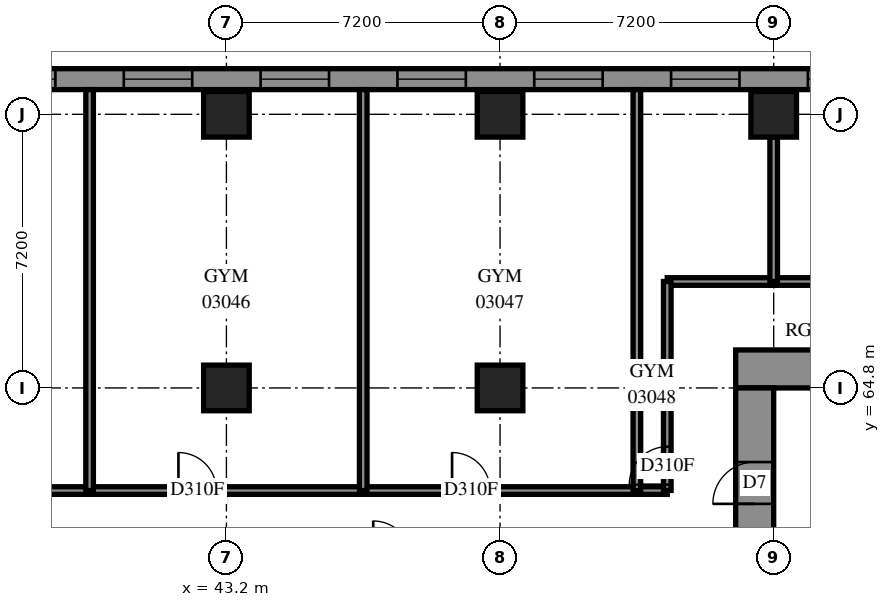
"""IFC4 building model, lengths in metres.
Left out: names, types, materials, properties, quantities, classifications, styles, units other than length and angle.
Written with IfcOpenShell. Run it as: python <this file> out.ifc"""

import sys

from ifc_helpers import new_model, si_unit, direction, frame, frame_2d, origin, origin_2d, place, context, subcontext, project, spatial, polyline, rectangle, outline, extrude, element, fill, save


model = new_model("IFC4")
c1 = context("Model", 3, precision=1e-05, world=origin(), true_north=direction((0.0, 1.0)))
c2 = subcontext(c1, "Body", "Model", "MODEL_VIEW")
j1 = project(units=[si_unit("LENGTHUNIT", "METRE"), si_unit("PLANEANGLEUNIT", "RADIAN")], contexts=[c1])
p1 = place(None, origin())
s1 = spatial("IfcSite", under=j1, at=p1, CompositionType="ELEMENT")
p2 = place(p1, origin())
s2 = spatial("IfcBuilding", under=s1, at=p2, CompositionType="ELEMENT")
p3 = place(p2, frame((0.0, 0.0, 14.4)))
s3 = spatial("IfcBuildingStorey", under=s2, at=p3, CompositionType="ELEMENT", Elevation=14.4)
for number, where, z_axis, x_axis in (
    (1, (43.2, 64.8, 0.0), (0.0, 0.0, 1.0), (1.0, 0.0, 0.0)),
    (2, (43.2, 72.0, 0.0), (0.0, 0.0, 1.0), (1.0, 0.0, 0.0)),
    (3, (50.4, 64.8, 0.0), (0.0, 0.0, 1.0), (1.0, 0.0, 0.0)),
    (4, (50.4, 72.0, 0.0), (0.0, 0.0, 1.0), (1.0, 0.0, 0.0)),
    (5, (57.6, 72.0, 0.0), (0.0, 0.0, 1.0), (1.0, 0.0, 0.0)),
):
    element("IfcColumn", number, at=place(p3, frame(where, z_axis=z_axis, x_axis=x_axis)), inside=s3, PredefinedType="COLUMN", context=c2, shape_type="SweptSolid", body=[
        extrude(rectangle(XDim=1.2, YDim=1.2, at=origin_2d()), origin(), (0.0, 0.0, 1.0), 3.8),
    ])
p4 = place(p3, frame((56.6, 65.3, -0.4), z_axis=(0.0, 0.0, 1.0), x_axis=(1.0, 0.0, 0.0)))
e6 = element("IfcWall", 6, at=p4, inside=s3, PredefinedType="SHEAR", context=c2, shape_type="SweptSolid", body=[
    extrude(rectangle(XDim=16.4, YDim=1.0, at=frame_2d((8.2, 0.0))), origin(), (0.0, 0.0, 1.0), 3.5),
])
p5 = place(p4, frame((11.0, 0.0, 0.4)))
e7 = element("IfcOpeningElement", 7, at=p5, cuts=e6, PredefinedType="OPENING", context=c2, shape_type="SweptSolid", body=[
    extrude(rectangle(XDim=0.8, YDim=2.1, at=frame_2d((0.4, 1.05))), frame((0.0, 0.51, 0.0), z_axis=(0.0, -1.0, 0.0), x_axis=(1.0, 0.0, 0.0)), (0.0, 0.0, 1.0), 1.02),
])
p6 = place(p3, frame((57.1, 50.4, -0.4), z_axis=(0.0, 0.0, 1.0), x_axis=(0.0, 1.0, 0.0)))
e8 = element("IfcWall", 8, at=p6, inside=s3, PredefinedType="SHEAR", context=c2, shape_type="SweptSolid", body=[
    extrude(rectangle(XDim=14.4, YDim=1.0, at=frame_2d((7.2, 0.0))), origin(), (0.0, 0.0, 1.0), 3.5),
])
p7 = place(p6, frame((4.55, 0.0, 0.4)))
e9 = element("IfcOpeningElement", 9, at=p7, cuts=e8, PredefinedType="OPENING", context=c2, shape_type="SweptSolid", body=[
    extrude(rectangle(XDim=1.1, YDim=2.1, at=frame_2d((0.55, 1.05))), frame((0.0, 0.51, 0.0), z_axis=(0.0, -1.0, 0.0), x_axis=(1.0, 0.0, 0.0)), (0.0, 0.0, 1.0), 1.02),
])
p8 = place(p6, frame((11.35, 0.0, 0.4)))
e10 = element("IfcOpeningElement", 10, at=p8, cuts=e8, PredefinedType="OPENING", context=c2, shape_type="SweptSolid", body=[
    extrude(rectangle(XDim=1.1, YDim=2.1, at=frame_2d((0.55, 1.05))), frame((0.0, 0.51, 0.0), z_axis=(0.0, -1.0, 0.0), x_axis=(1.0, 0.0, 0.0)), (0.0, 0.0, 1.0), 1.02),
])
p9 = place(p3, frame((79.583, 72.925, 0.0), z_axis=(0.0, 0.0, 1.0), x_axis=(-1.0, 0.0, 0.0)))
e11 = element("IfcWall", 11, at=p9, inside=s3, PredefinedType="SOLIDWALL", context=c2, shape_type="SweptSolid", body=[
    extrude(outline(polyline([(-0.114, -0.275), (79.583, -0.275), (79.033, 0.275), (0.114, 0.275), (-0.114, -0.275)])), origin(), (0.0, 0.0, 1.0), 3.8),
])
p10 = place(p9, frame((1.249, 0.0, 0.7)))
e12 = element("IfcOpeningElement", 12, at=p10, cuts=e11, PredefinedType="OPENING", context=c2, shape_type="SweptSolid", body=[
    extrude(rectangle(XDim=1.8, YDim=2.6, at=frame_2d((0.9, 1.3))), frame((0.0, 0.285, 0.0), z_axis=(0.0, -1.0, 0.0), x_axis=(1.0, 0.0, 0.0)), (0.0, 0.0, 1.0), 0.57),
])
p11 = place(p9, frame((4.883, 0.0, 0.7)))
e13 = element("IfcOpeningElement", 13, at=p11, cuts=e11, PredefinedType="OPENING", context=c2, shape_type="SweptSolid", body=[
    extrude(rectangle(XDim=1.8, YDim=2.6, at=frame_2d((0.9, 1.3))), frame((0.0, 0.285, 0.0), z_axis=(0.0, -1.0, 0.0), x_axis=(1.0, 0.0, 0.0)), (0.0, 0.0, 1.0), 0.57),
])
p12 = place(p9, frame((8.483, 0.0, 0.7)))
e14 = element("IfcOpeningElement", 14, at=p12, cuts=e11, PredefinedType="OPENING", context=c2, shape_type="SweptSolid", body=[
    extrude(rectangle(XDim=1.8, YDim=2.6, at=frame_2d((0.9, 1.3))), frame((0.0, 0.285, 0.0), z_axis=(0.0, -1.0, 0.0), x_axis=(1.0, 0.0, 0.0)), (0.0, 0.0, 1.0), 0.57),
])
p13 = place(p9, frame((12.083, 0.0, 0.7)))
e15 = element("IfcOpeningElement", 15, at=p13, cuts=e11, PredefinedType="OPENING", context=c2, shape_type="SweptSolid", body=[
    extrude(rectangle(XDim=1.8, YDim=2.6, at=frame_2d((0.9, 1.3))), frame((0.0, 0.285, 0.0), z_axis=(0.0, -1.0, 0.0), x_axis=(1.0, 0.0, 0.0)), (0.0, 0.0, 1.0), 0.57),
])
p14 = place(p9, frame((15.683, 0.0, 0.7)))
e16 = element("IfcOpeningElement", 16, at=p14, cuts=e11, PredefinedType="OPENING", context=c2, shape_type="SweptSolid", body=[
    extrude(rectangle(XDim=1.8, YDim=2.6, at=frame_2d((0.9, 1.3))), frame((0.0, 0.285, 0.0), z_axis=(0.0, -1.0, 0.0), x_axis=(1.0, 0.0, 0.0)), (0.0, 0.0, 1.0), 0.57),
])
p15 = place(p9, frame((19.283, 0.0, 0.7)))
e17 = element("IfcOpeningElement", 17, at=p15, cuts=e11, PredefinedType="OPENING", context=c2, shape_type="SweptSolid", body=[
    extrude(rectangle(XDim=1.8, YDim=2.6, at=frame_2d((0.9, 1.3))), frame((0.0, 0.285, 0.0), z_axis=(0.0, -1.0, 0.0), x_axis=(1.0, 0.0, 0.0)), (0.0, 0.0, 1.0), 0.57),
])
p16 = place(p9, frame((22.883, 0.0, 0.7)))
e18 = element("IfcOpeningElement", 18, at=p16, cuts=e11, PredefinedType="OPENING", context=c2, shape_type="SweptSolid", body=[
    extrude(rectangle(XDim=1.8, YDim=2.6, at=frame_2d((0.9, 1.3))), frame((0.0, 0.285, 0.0), z_axis=(0.0, -1.0, 0.0), x_axis=(1.0, 0.0, 0.0)), (0.0, 0.0, 1.0), 0.57),
])
p17 = place(p9, frame((26.483, 0.0, 0.7)))
e19 = element("IfcOpeningElement", 19, at=p17, cuts=e11, PredefinedType="OPENING", context=c2, shape_type="SweptSolid", body=[
    extrude(rectangle(XDim=1.8, YDim=2.6, at=frame_2d((0.9, 1.3))), frame((0.0, 0.285, 0.0), z_axis=(0.0, -1.0, 0.0), x_axis=(1.0, 0.0, 0.0)), (0.0, 0.0, 1.0), 0.57),
])
p18 = place(p9, frame((30.083, 0.0, 0.7)))
e20 = element("IfcOpeningElement", 20, at=p18, cuts=e11, PredefinedType="OPENING", context=c2, shape_type="SweptSolid", body=[
    extrude(rectangle(XDim=1.8, YDim=2.6, at=frame_2d((0.9, 1.3))), frame((0.0, 0.285, 0.0), z_axis=(0.0, -1.0, 0.0), x_axis=(1.0, 0.0, 0.0)), (0.0, 0.0, 1.0), 0.57),
])
p19 = place(p9, frame((33.683, 0.0, 0.7)))
e21 = element("IfcOpeningElement", 21, at=p19, cuts=e11, PredefinedType="OPENING", context=c2, shape_type="SweptSolid", body=[
    extrude(rectangle(XDim=1.8, YDim=2.6, at=frame_2d((0.9, 1.3))), frame((0.0, 0.285, 0.0), z_axis=(0.0, -1.0, 0.0), x_axis=(1.0, 0.0, 0.0)), (0.0, 0.0, 1.0), 0.57),
])
p20 = place(p9, frame((37.283, 0.0, 0.7)))
e22 = element("IfcOpeningElement", 22, at=p20, cuts=e11, PredefinedType="OPENING", context=c2, shape_type="SweptSolid", body=[
    extrude(rectangle(XDim=1.8, YDim=2.6, at=frame_2d((0.9, 1.3))), frame((0.0, 0.285, 0.0), z_axis=(0.0, -1.0, 0.0), x_axis=(1.0, 0.0, 0.0)), (0.0, 0.0, 1.0), 0.57),
])
p21 = place(p9, frame((40.883, 0.0, 0.7)))
e23 = element("IfcOpeningElement", 23, at=p21, cuts=e11, PredefinedType="OPENING", context=c2, shape_type="SweptSolid", body=[
    extrude(rectangle(XDim=1.8, YDim=2.6, at=frame_2d((0.9, 1.3))), frame((0.0, 0.285, 0.0), z_axis=(0.0, -1.0, 0.0), x_axis=(1.0, 0.0, 0.0)), (0.0, 0.0, 1.0), 0.57),
])
p22 = place(p9, frame((44.483, 0.0, 0.7)))
e24 = element("IfcOpeningElement", 24, at=p22, cuts=e11, PredefinedType="OPENING", context=c2, shape_type="SweptSolid", body=[
    extrude(rectangle(XDim=1.8, YDim=2.6, at=frame_2d((0.9, 1.3))), frame((0.0, 0.285, 0.0), z_axis=(0.0, -1.0, 0.0), x_axis=(1.0, 0.0, 0.0)), (0.0, 0.0, 1.0), 0.57),
])
p23 = place(p9, frame((48.083, 0.0, 0.7)))
e25 = element("IfcOpeningElement", 25, at=p23, cuts=e11, PredefinedType="OPENING", context=c2, shape_type="SweptSolid", body=[
    extrude(rectangle(XDim=1.8, YDim=2.6, at=frame_2d((0.9, 1.3))), frame((0.0, 0.285, 0.0), z_axis=(0.0, -1.0, 0.0), x_axis=(1.0, 0.0, 0.0)), (0.0, 0.0, 1.0), 0.57),
])
p24 = place(p9, frame((51.683, 0.0, 0.7)))
e26 = element("IfcOpeningElement", 26, at=p24, cuts=e11, PredefinedType="OPENING", context=c2, shape_type="SweptSolid", body=[
    extrude(rectangle(XDim=1.8, YDim=2.6, at=frame_2d((0.9, 1.3))), frame((0.0, 0.285, 0.0), z_axis=(0.0, -1.0, 0.0), x_axis=(1.0, 0.0, 0.0)), (0.0, 0.0, 1.0), 0.57),
])
p25 = place(p9, frame((55.283, 0.0, 0.7)))
e27 = element("IfcOpeningElement", 27, at=p25, cuts=e11, PredefinedType="OPENING", context=c2, shape_type="SweptSolid", body=[
    extrude(rectangle(XDim=1.8, YDim=2.6, at=frame_2d((0.9, 1.3))), frame((0.0, 0.285, 0.0), z_axis=(0.0, -1.0, 0.0), x_axis=(1.0, 0.0, 0.0)), (0.0, 0.0, 1.0), 0.57),
])
p26 = place(p9, frame((58.883, 0.0, 0.7)))
e28 = element("IfcOpeningElement", 28, at=p26, cuts=e11, PredefinedType="OPENING", context=c2, shape_type="SweptSolid", body=[
    extrude(rectangle(XDim=1.8, YDim=2.6, at=frame_2d((0.9, 1.3))), frame((0.0, 0.285, 0.0), z_axis=(0.0, -1.0, 0.0), x_axis=(1.0, 0.0, 0.0)), (0.0, 0.0, 1.0), 0.57),
])
p27 = place(p9, frame((62.483, 0.0, 0.7)))
e29 = element("IfcOpeningElement", 29, at=p27, cuts=e11, PredefinedType="OPENING", context=c2, shape_type="SweptSolid", body=[
    extrude(rectangle(XDim=1.8, YDim=2.6, at=frame_2d((0.9, 1.3))), frame((0.0, 0.285, 0.0), z_axis=(0.0, -1.0, 0.0), x_axis=(1.0, 0.0, 0.0)), (0.0, 0.0, 1.0), 0.57),
])
p28 = place(p9, frame((66.083, 0.0, 0.7)))
e30 = element("IfcOpeningElement", 30, at=p28, cuts=e11, PredefinedType="OPENING", context=c2, shape_type="SweptSolid", body=[
    extrude(rectangle(XDim=1.8, YDim=2.6, at=frame_2d((0.9, 1.3))), frame((0.0, 0.285, 0.0), z_axis=(0.0, -1.0, 0.0), x_axis=(1.0, 0.0, 0.0)), (0.0, 0.0, 1.0), 0.57),
])
p29 = place(p9, frame((69.683, 0.0, 0.7)))
e31 = element("IfcOpeningElement", 31, at=p29, cuts=e11, PredefinedType="OPENING", context=c2, shape_type="SweptSolid", body=[
    extrude(rectangle(XDim=1.8, YDim=2.6, at=frame_2d((0.9, 1.3))), frame((0.0, 0.285, 0.0), z_axis=(0.0, -1.0, 0.0), x_axis=(1.0, 0.0, 0.0)), (0.0, 0.0, 1.0), 0.57),
])
p30 = place(p9, frame((73.683, 0.0, 0.7)))
e32 = element("IfcOpeningElement", 32, at=p30, cuts=e11, PredefinedType="OPENING", context=c2, shape_type="SweptSolid", body=[
    extrude(rectangle(XDim=1.8, YDim=2.6, at=frame_2d((0.9, 1.3))), frame((0.0, 0.285, 0.0), z_axis=(0.0, -1.0, 0.0), x_axis=(1.0, 0.0, 0.0)), (0.0, 0.0, 1.0), 0.57),
])
p31 = place(p9, frame((76.508, 0.0, 0.7)))
e33 = element("IfcOpeningElement", 33, at=p31, cuts=e11, PredefinedType="OPENING", context=c2, shape_type="SweptSolid", body=[
    extrude(rectangle(XDim=1.8, YDim=2.6, at=frame_2d((0.9, 1.3))), frame((0.0, 0.285, 0.0), z_axis=(0.0, -1.0, 0.0), x_axis=(1.0, 0.0, 0.0)), (0.0, 0.0, 1.0), 0.57),
])
p32 = place(p3, frame((0.002, 62.1, 0.0), z_axis=(0.0, 0.0, 1.0), x_axis=(1.0, 0.0, 0.0)))
e34 = element("IfcWall", 34, at=p32, inside=s3, PredefinedType="PARTITIONING", context=c2, shape_type="SweptSolid", body=[
    extrude(rectangle(XDim=54.798, YDim=0.2, at=frame_2d((27.399, 0.0))), origin(), (0.0, 0.0, 1.0), 3.8),
])
p33 = place(p32, frame((8.667, 0.0, 0.0)))
e35 = element("IfcOpeningElement", 35, at=p33, cuts=e34, PredefinedType="OPENING", context=c2, shape_type="SweptSolid", body=[
    extrude(rectangle(XDim=1.0, YDim=2.1, at=frame_2d((0.5, 1.05))), frame((0.0, 0.11, 0.0), z_axis=(0.0, -1.0, 0.0), x_axis=(1.0, 0.0, 0.0)), (0.0, 0.0, 1.0), 0.22),
])
p34 = place(p32, frame((13.136, 0.0, 0.0)))
e36 = element("IfcOpeningElement", 36, at=p34, cuts=e34, PredefinedType="OPENING", context=c2, shape_type="SweptSolid", body=[
    extrude(rectangle(XDim=1.0, YDim=2.1, at=frame_2d((0.5, 1.05))), frame((0.0, 0.11, 0.0), z_axis=(0.0, -1.0, 0.0), x_axis=(1.0, 0.0, 0.0)), (0.0, 0.0, 1.0), 0.22),
])
p35 = place(p32, frame((20.335, 0.0, 0.0)))
e37 = element("IfcOpeningElement", 37, at=p35, cuts=e34, PredefinedType="OPENING", context=c2, shape_type="SweptSolid", body=[
    extrude(rectangle(XDim=1.0, YDim=2.1, at=frame_2d((0.5, 1.05))), frame((0.0, 0.11, 0.0), z_axis=(0.0, -1.0, 0.0), x_axis=(1.0, 0.0, 0.0)), (0.0, 0.0, 1.0), 0.22),
])
p36 = place(p32, frame((27.535, 0.0, 0.0)))
e38 = element("IfcOpeningElement", 38, at=p36, cuts=e34, PredefinedType="OPENING", context=c2, shape_type="SweptSolid", body=[
    extrude(rectangle(XDim=1.0, YDim=2.1, at=frame_2d((0.5, 1.05))), frame((0.0, 0.11, 0.0), z_axis=(0.0, -1.0, 0.0), x_axis=(1.0, 0.0, 0.0)), (0.0, 0.0, 1.0), 0.22),
])
p37 = place(p32, frame((34.736, 0.0, 0.0)))
e39 = element("IfcOpeningElement", 39, at=p37, cuts=e34, PredefinedType="OPENING", context=c2, shape_type="SweptSolid", body=[
    extrude(rectangle(XDim=1.0, YDim=2.1, at=frame_2d((0.5, 1.05))), frame((0.0, 0.11, 0.0), z_axis=(0.0, -1.0, 0.0), x_axis=(1.0, 0.0, 0.0)), (0.0, 0.0, 1.0), 0.22),
])
p38 = place(p32, frame((41.935, 0.0, 0.0)))
e40 = element("IfcOpeningElement", 40, at=p38, cuts=e34, PredefinedType="OPENING", context=c2, shape_type="SweptSolid", body=[
    extrude(rectangle(XDim=1.0, YDim=2.1, at=frame_2d((0.5, 1.05))), frame((0.0, 0.11, 0.0), z_axis=(0.0, -1.0, 0.0), x_axis=(1.0, 0.0, 0.0)), (0.0, 0.0, 1.0), 0.22),
])
p39 = place(p32, frame((49.136, 0.0, 0.0)))
e41 = element("IfcOpeningElement", 41, at=p39, cuts=e34, PredefinedType="OPENING", context=c2, shape_type="SweptSolid", body=[
    extrude(rectangle(XDim=1.0, YDim=2.1, at=frame_2d((0.5, 1.05))), frame((0.0, 0.11, 0.0), z_axis=(0.0, -1.0, 0.0), x_axis=(1.0, 0.0, 0.0)), (0.0, 0.0, 1.0), 0.22),
])
p40 = place(p32, frame((4.799, 0.0, 0.0)))
e42 = element("IfcOpeningElement", 42, at=p40, cuts=e34, PredefinedType="OPENING", context=c2, shape_type="SweptSolid", body=[
    extrude(rectangle(XDim=1.0, YDim=2.1, at=frame_2d((0.5, 1.05))), frame((0.0, 0.11, 0.0), z_axis=(0.0, -1.0, 0.0), x_axis=(1.0, 0.0, 0.0)), (0.0, 0.0, 1.0), 0.22),
])
p41 = place(p3, frame((54.8, 67.6, 0.0), z_axis=(0.0, 0.0, 1.0), x_axis=(1.0, 0.0, 0.0)))
e43 = element("IfcWall", 43, at=p41, inside=s3, PredefinedType="PARTITIONING", context=c2, shape_type="SweptSolid", body=[
    extrude(rectangle(XDim=20.0, YDim=0.2, at=frame_2d((10.0, 0.0))), origin(), (0.0, 0.0, 1.0), 3.8),
])
p42 = place(p41, frame((6.662, 0.0, 0.0)))
e44 = element("IfcOpeningElement", 44, at=p42, cuts=e43, PredefinedType="OPENING", context=c2, shape_type="SweptSolid", body=[
    extrude(rectangle(XDim=1.0, YDim=2.1, at=frame_2d((0.5, 1.05))), frame((0.0, 0.11, 0.0), z_axis=(0.0, -1.0, 0.0), x_axis=(1.0, 0.0, 0.0)), (0.0, 0.0, 1.0), 0.22),
])
p43 = place(p41, frame((13.863, 0.0, 0.0)))
e45 = element("IfcOpeningElement", 45, at=p43, cuts=e43, PredefinedType="OPENING", context=c2, shape_type="SweptSolid", body=[
    extrude(rectangle(XDim=1.0, YDim=2.1, at=frame_2d((0.5, 1.05))), frame((0.0, 0.11, 0.0), z_axis=(0.0, -1.0, 0.0), x_axis=(1.0, 0.0, 0.0)), (0.0, 0.0, 1.0), 0.22),
])
for number, where, z_axis, x_axis in (
    (46, (39.6, 62.1, 0.0), (0.0, 0.0, 1.0), (0.0, 1.0, 0.0)),
    (47, (46.8, 62.1, 0.0), (0.0, 0.0, 1.0), (0.0, 1.0, 0.0)),
    (48, (54.0, 62.1, 0.0), (0.0, 0.0, 1.0), (0.0, 1.0, 0.0)),
):
    element("IfcWall", number, at=place(p3, frame(where, z_axis=z_axis, x_axis=x_axis)), inside=s3, PredefinedType="PARTITIONING", context=c2, shape_type="SweptSolid", body=[
        extrude(rectangle(XDim=10.55, YDim=0.2, at=frame_2d((5.275, 0.0))), origin(), (0.0, 0.0, 1.0), 3.8),
    ])
p44 = place(p3, frame((54.8, 62.102, 0.0), z_axis=(0.0, 0.0, 1.0), x_axis=(0.0, 1.0, 0.0)))
e49 = element("IfcWall", 49, at=p44, inside=s3, PredefinedType="PARTITIONING", context=c2, shape_type="SweptSolid", body=[
    extrude(rectangle(XDim=5.498, YDim=0.2, at=frame_2d((2.749, 0.0))), origin(), (0.0, 0.0, 1.0), 3.8),
])
p45 = place(p44, frame((0.152, 0.0, 0.0)))
e50 = element("IfcOpeningElement", 50, at=p45, cuts=e49, PredefinedType="OPENING", context=c2, shape_type="SweptSolid", body=[
    extrude(rectangle(XDim=1.0, YDim=2.1, at=frame_2d((0.5, 1.05))), frame((0.0, 0.11, 0.0), z_axis=(0.0, -1.0, 0.0), x_axis=(1.0, 0.0, 0.0)), (0.0, 0.0, 1.0), 0.22),
])
p46 = place(p3, frame((57.6, 67.6, 0.0), z_axis=(0.0, 0.0, 1.0), x_axis=(0.0, 1.0, 0.0)))
e51 = element("IfcWall", 51, at=p46, inside=s3, PredefinedType="PARTITIONING", context=c2, shape_type="SweptSolid", body=[
    extrude(rectangle(XDim=3.8, YDim=0.2, at=frame_2d((1.9, 0.0))), origin(), (0.0, 0.0, 1.0), 3.8),
])
p47 = place(p15, origin())
e52 = element("IfcWindow", 52, at=p47, inside=s3, PartitioningType="SINGLE_PANEL", PredefinedType="WINDOW", context=c2, shape_type="SweptSolid", body=[
    extrude(rectangle(XDim=1.8, YDim=2.6, at=frame_2d((0.9, 1.3))), frame((0.0, 0.155, 0.0), z_axis=(0.0, -1.0, 0.0), x_axis=(1.0, 0.0, 0.0)), (0.0, 0.0, 1.0), 0.06),
])
fill(e17, e52)
p48 = place(p16, origin())
e53 = element("IfcWindow", 53, at=p48, inside=s3, PartitioningType="SINGLE_PANEL", PredefinedType="WINDOW", context=c2, shape_type="SweptSolid", body=[
    extrude(rectangle(XDim=1.8, YDim=2.6, at=frame_2d((0.9, 1.3))), frame((0.0, 0.155, 0.0), z_axis=(0.0, -1.0, 0.0), x_axis=(1.0, 0.0, 0.0)), (0.0, 0.0, 1.0), 0.06),
])
fill(e18, e53)
p49 = place(p17, origin())
e54 = element("IfcWindow", 54, at=p49, inside=s3, PartitioningType="SINGLE_PANEL", PredefinedType="WINDOW", context=c2, shape_type="SweptSolid", body=[
    extrude(rectangle(XDim=1.8, YDim=2.6, at=frame_2d((0.9, 1.3))), frame((0.0, 0.155, 0.0), z_axis=(0.0, -1.0, 0.0), x_axis=(1.0, 0.0, 0.0)), (0.0, 0.0, 1.0), 0.06),
])
fill(e19, e54)
p50 = place(p18, origin())
e55 = element("IfcWindow", 55, at=p50, inside=s3, PartitioningType="SINGLE_PANEL", PredefinedType="WINDOW", context=c2, shape_type="SweptSolid", body=[
    extrude(rectangle(XDim=1.8, YDim=2.6, at=frame_2d((0.9, 1.3))), frame((0.0, 0.155, 0.0), z_axis=(0.0, -1.0, 0.0), x_axis=(1.0, 0.0, 0.0)), (0.0, 0.0, 1.0), 0.06),
])
fill(e20, e55)
p51 = place(p19, origin())
e56 = element("IfcWindow", 56, at=p51, inside=s3, PartitioningType="SINGLE_PANEL", PredefinedType="WINDOW", context=c2, shape_type="SweptSolid", body=[
    extrude(rectangle(XDim=1.8, YDim=2.6, at=frame_2d((0.9, 1.3))), frame((0.0, 0.155, 0.0), z_axis=(0.0, -1.0, 0.0), x_axis=(1.0, 0.0, 0.0)), (0.0, 0.0, 1.0), 0.06),
])
fill(e21, e56)
p52 = place(p20, origin())
e57 = element("IfcWindow", 57, at=p52, inside=s3, PartitioningType="SINGLE_PANEL", PredefinedType="WINDOW", context=c2, shape_type="SweptSolid", body=[
    extrude(rectangle(XDim=1.8, YDim=2.6, at=frame_2d((0.9, 1.3))), frame((0.0, 0.155, 0.0), z_axis=(0.0, -1.0, 0.0), x_axis=(1.0, 0.0, 0.0)), (0.0, 0.0, 1.0), 0.06),
])
fill(e22, e57)
p53 = place(p21, origin())
e58 = element("IfcWindow", 58, at=p53, inside=s3, PartitioningType="SINGLE_PANEL", PredefinedType="WINDOW", context=c2, shape_type="SweptSolid", body=[
    extrude(rectangle(XDim=1.8, YDim=2.6, at=frame_2d((0.9, 1.3))), frame((0.0, 0.155, 0.0), z_axis=(0.0, -1.0, 0.0), x_axis=(1.0, 0.0, 0.0)), (0.0, 0.0, 1.0), 0.06),
])
fill(e23, e58)
p54 = place(p8, origin())
e59 = element("IfcDoor", 59, at=p54, inside=s3, OperationType="SINGLE_SWING_LEFT", PredefinedType="DOOR", context=c2, shape_type="SweptSolid", body=[
    extrude(rectangle(XDim=1.1, YDim=2.1, at=frame_2d((0.55, 1.05))), frame((0.0, 0.025, 0.0), z_axis=(0.0, -1.0, 0.0), x_axis=(1.0, 0.0, 0.0)), (0.0, 0.0, 1.0), 0.05),
])
fill(e10, e59)
p55 = place(p38, origin())
e60 = element("IfcDoor", 60, at=p55, inside=s3, OperationType="SINGLE_SWING_LEFT", PredefinedType="DOOR", context=c2, shape_type="SweptSolid", body=[
    extrude(rectangle(XDim=1.0, YDim=2.1, at=frame_2d((0.5, 1.05))), frame((0.0, 0.025, 0.0), z_axis=(0.0, -1.0, 0.0), x_axis=(1.0, 0.0, 0.0)), (0.0, 0.0, 1.0), 0.05),
])
fill(e40, e60)
p56 = place(p39, origin())
e61 = element("IfcDoor", 61, at=p56, inside=s3, OperationType="SINGLE_SWING_LEFT", PredefinedType="DOOR", context=c2, shape_type="SweptSolid", body=[
    extrude(rectangle(XDim=1.0, YDim=2.1, at=frame_2d((0.5, 1.05))), frame((0.0, 0.025, 0.0), z_axis=(0.0, -1.0, 0.0), x_axis=(1.0, 0.0, 0.0)), (0.0, 0.0, 1.0), 0.05),
])
fill(e41, e61)
p57 = place(p45, origin())
e62 = element("IfcDoor", 62, at=p57, inside=s3, OperationType="SINGLE_SWING_LEFT", PredefinedType="DOOR", context=c2, shape_type="SweptSolid", body=[
    extrude(rectangle(XDim=1.0, YDim=2.1, at=frame_2d((0.5, 1.05))), frame((0.0, 0.025, 0.0), z_axis=(0.0, -1.0, 0.0), x_axis=(1.0, 0.0, 0.0)), (0.0, 0.0, 1.0), 0.05),
])
fill(e50, e62)
save(model, sys.argv[1])
